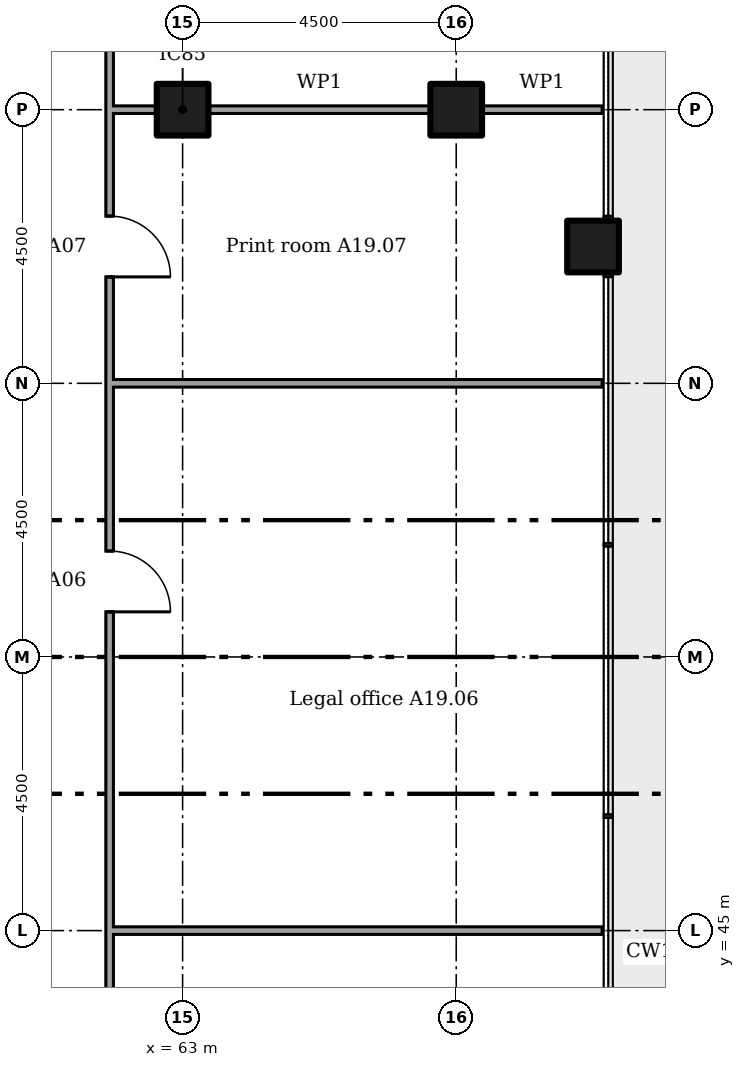
"""IFC4 building model, lengths in metres.
Left out: names, types, materials, properties, quantities, classifications, styles, units other than length and angle.
Written with IfcOpenShell. Run it as: python <this file> out.ifc"""

import sys

from ifc_helpers import new_model, si_unit, direction, frame, frame_2d, origin, origin_2d, place, context, subcontext, project, spatial, rectangle, extrude, element, fill, save


model = new_model("IFC4")
c1 = context("Model", 3, precision=1e-05, world=origin(), true_north=direction((0.0, 1.0)))
c2 = subcontext(c1, "Body", "Model", "MODEL_VIEW")
j1 = project(units=[si_unit("LENGTHUNIT", "METRE"), si_unit("PLANEANGLEUNIT", "RADIAN")], contexts=[c1])
p1 = place(None, origin())
s1 = spatial("IfcSite", under=j1, at=p1, CompositionType="ELEMENT")
p2 = place(p1, origin())
s2 = spatial("IfcBuilding", under=s1, at=p2, CompositionType="ELEMENT")
p3 = place(p2, frame((0.0, 0.0, 79.8)))
s3 = spatial("IfcBuildingStorey", under=s2, at=p3, CompositionType="ELEMENT", Elevation=79.8)
for number, where in (
    (1, (63.0, 58.5, 0.0)),
    (2, (67.5, 58.5, 0.0)),
    (3, (69.75, 56.25, 0.0)),
):
    element("IfcColumn", number, at=place(p3, frame(where)), inside=s3, PredefinedType="COLUMN", context=c2, shape_type="SweptSolid", body=[
        extrude(rectangle(XDim=0.85, YDim=0.85, at=origin_2d()), origin(), (0.0, 0.0, 1.0), 3.6),
    ])
for number, where in (
    (4, (61.8, 45.0, 0.0)),
    (5, (61.8, 54.0, 0.0)),
):
    element("IfcWall", number, at=place(p3, frame(where)), inside=s3, PredefinedType="PARTITIONING", context=c2, shape_type="SweptSolid", body=[
        extrude(rectangle(XDim=8.1, YDim=0.125, at=frame_2d((4.05, 0.0))), origin(), (0.0, 0.0, 1.0), 2.766),
    ])
p4 = place(p3, frame((61.8, 58.5, 0.0)))
e6 = element("IfcWall", 6, at=p4, inside=s3, PredefinedType="PARTITIONING", context=c2, shape_type="SweptSolid", body=[
    extrude(rectangle(XDim=0.775, YDim=0.125, at=frame_2d((0.387, 0.0))), origin(), (0.0, 0.0, 1.0), 2.676),
])
p5 = place(p3, frame((63.425, 58.5, 0.0)))
e7 = element("IfcWall", 7, at=p5, inside=s3, PredefinedType="PARTITIONING", context=c2, shape_type="SweptSolid", body=[
    extrude(rectangle(XDim=3.65, YDim=0.125, at=frame_2d((1.825, 0.0))), origin(), (0.0, 0.0, 1.0), 2.676),
])
p6 = place(p3, frame((67.925, 58.5, 0.0)))
e8 = element("IfcWall", 8, at=p6, inside=s3, PredefinedType="PARTITIONING", context=c2, shape_type="SweptSolid", body=[
    extrude(rectangle(XDim=1.975, YDim=0.125, at=frame_2d((0.987, 0.0))), origin(), (0.0, 0.0, 1.0), 2.676),
])
p7 = place(p3, frame((61.8, 37.262, 0.0), z_axis=(0.0, 0.0, 1.0), x_axis=(0.0, 1.0, 0.0)))
e9 = element("IfcWall", 9, at=p7, inside=s3, PredefinedType="PARTITIONING", context=c2, shape_type="SweptSolid", body=[
    extrude(rectangle(XDim=24.475, YDim=0.125, at=frame_2d((12.238, 0.0))), origin(), (0.0, 0.0, 1.0), 3.45),
])
p8 = place(p7, frame((4.532, 0.0, 0.0)))
e10 = element("IfcOpeningElement", 10, at=p8, cuts=e9, PredefinedType="OPENING", context=c2, shape_type="SweptSolid", body=[
    extrude(rectangle(XDim=1.0, YDim=2.1, at=frame_2d((0.5, 1.05))), frame((0.0, 0.073, 0.0), z_axis=(0.0, -1.0, 0.0), x_axis=(1.0, 0.0, 0.0)), (0.0, 0.0, 1.0), 0.145),
])
p9 = place(p7, frame((12.979, 0.0, 0.0)))
e11 = element("IfcOpeningElement", 11, at=p9, cuts=e9, PredefinedType="OPENING", context=c2, shape_type="SweptSolid", body=[
    extrude(rectangle(XDim=1.0, YDim=2.1, at=frame_2d((0.5, 1.05))), frame((0.0, 0.073, 0.0), z_axis=(0.0, -1.0, 0.0), x_axis=(1.0, 0.0, 0.0)), (0.0, 0.0, 1.0), 0.145),
])
p10 = place(p7, frame((18.488, 0.0, 0.0)))
e12 = element("IfcOpeningElement", 12, at=p10, cuts=e9, PredefinedType="OPENING", context=c2, shape_type="SweptSolid", body=[
    extrude(rectangle(XDim=1.0, YDim=2.1, at=frame_2d((0.5, 1.05))), frame((0.0, 0.073, 0.0), z_axis=(0.0, -1.0, 0.0), x_axis=(1.0, 0.0, 0.0)), (0.0, 0.0, 1.0), 0.145),
])
p11 = place(p9, frame((1.0, 0.0, 0.0), x_axis=(-1.0, 0.0, 0.0)))
e13 = element("IfcDoor", 13, at=p11, inside=s3, OperationType="SINGLE_SWING_LEFT", PredefinedType="DOOR", context=c2, shape_type="SweptSolid", body=[
    extrude(rectangle(XDim=1.0, YDim=2.1, at=frame_2d((0.5, 1.05))), frame((0.0, 0.025, 0.0), z_axis=(0.0, -1.0, 0.0), x_axis=(1.0, 0.0, 0.0)), (0.0, 0.0, 1.0), 0.05),
])
fill(e11, e13)
p12 = place(p10, frame((1.0, 0.0, 0.0), x_axis=(-1.0, 0.0, 0.0)))
e14 = element("IfcDoor", 14, at=p12, inside=s3, OperationType="SINGLE_SWING_LEFT", PredefinedType="DOOR", context=c2, shape_type="SweptSolid", body=[
    extrude(rectangle(XDim=1.0, YDim=2.1, at=frame_2d((0.5, 1.05))), frame((0.0, 0.025, 0.0), z_axis=(0.0, -1.0, 0.0), x_axis=(1.0, 0.0, 0.0)), (0.0, 0.0, 1.0), 0.05),
])
fill(e12, e14)
save(model, sys.argv[1])
